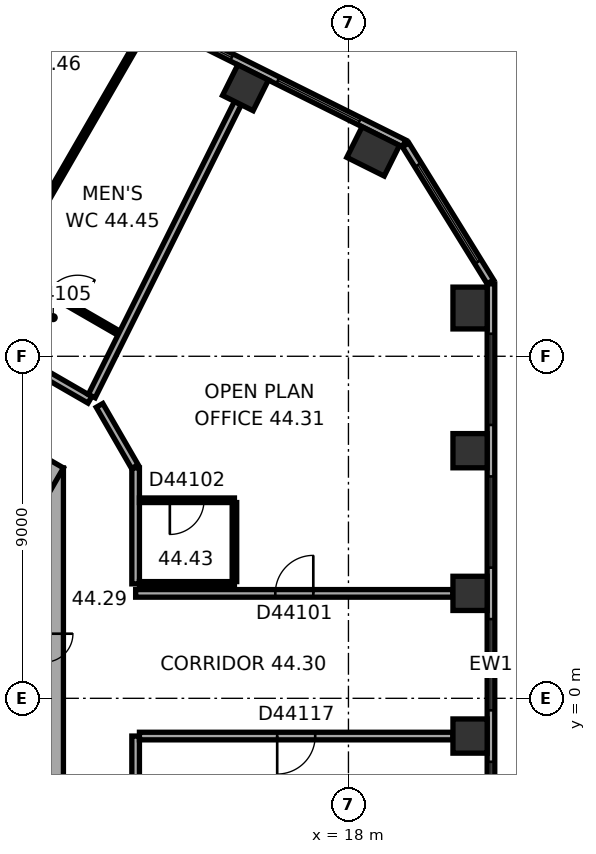
"""IFC4 building model, lengths in metres.
Left out: names, types, materials, properties, quantities, classifications, styles, units other than length and angle.
Written with IfcOpenShell. Run it as: python <this file> out.ifc"""

import sys

from ifc_helpers import new_model, si_unit, direction, frame, frame_2d, origin, origin_2d, place, context, subcontext, project, spatial, rectangle, extrude, element, fill, save


model = new_model("IFC4")
c1 = context("Model", 3, precision=1e-05, world=origin(), true_north=direction((0.0, 1.0)))
c2 = subcontext(c1, "Body", "Model", "MODEL_VIEW")
j1 = project(units=[si_unit("LENGTHUNIT", "METRE"), si_unit("PLANEANGLEUNIT", "RADIAN")], contexts=[c1])
p1 = place(None, origin())
s1 = spatial("IfcSite", under=j1, at=p1, CompositionType="ELEMENT")
p2 = place(p1, origin())
s2 = spatial("IfcBuilding", under=s1, at=p2, CompositionType="ELEMENT")
p3 = place(p2, frame((0.0, 0.0, 179.9)))
s3 = spatial("IfcBuildingStorey", under=s2, at=p3, CompositionType="ELEMENT", Elevation=179.9)
for number, where, z_axis, x_axis in (
    (1, (21.2, -0.993, 0.0), (0.0, 0.0, 1.0), (0.0, 1.0, 0.0)),
    (2, (21.2, 2.761, 0.0), (0.0, 0.0, 1.0), (0.0, 1.0, 0.0)),
    (3, (21.2, 6.515, 0.0), (0.0, 0.0, 1.0), (0.0, 1.0, 0.0)),
):
    element("IfcColumn", number, at=place(p3, frame(where, z_axis=z_axis, x_axis=x_axis)), inside=s3, PredefinedType="COLUMN", context=c2, shape_type="SweptSolid", body=[
        extrude(rectangle(XDim=0.9, YDim=0.9, at=origin_2d()), origin(), (0.0, 0.0, 1.0), 3.7),
    ])
for number, where, z_axis, x_axis in (
    (4, (21.2, 10.27, 0.0), (0.0, 0.0, 1.0), (0.0, 1.0, 0.0)),
    (5, (18.65, 14.39, 0.0), (0.0, 0.0, 1.0), (-0.895, 0.446, 0.0)),
):
    element("IfcColumn", number, at=place(p3, frame(where, z_axis=z_axis, x_axis=x_axis)), inside=s3, PredefinedType="COLUMN", context=c2, shape_type="SweptSolid", body=[
        extrude(rectangle(XDim=1.1, YDim=0.9, at=origin_2d()), origin(), (0.0, 0.0, 1.0), 3.7),
    ])
p4 = place(p3, frame((15.29, 16.065, 0.0), z_axis=(0.0, 0.0, 1.0), x_axis=(-0.894934361602, 0.44619781311, 0.0)))
e6 = element("IfcColumn", 6, at=p4, inside=s3, PredefinedType="COLUMN", context=c2, shape_type="SweptSolid", body=[
    extrude(rectangle(XDim=0.9, YDim=0.9, at=origin_2d()), origin(), (0.0, 0.0, 1.0), 3.7),
])
p5 = place(p3, frame((10.0, -6.062, 0.0), z_axis=(0.0, 0.0, 1.0), x_axis=(0.0, 1.0, 0.0)))
e7 = element("IfcWall", 7, at=p5, inside=s3, PredefinedType="SHEAR", context=c2, shape_type="SweptSolid", body=[
    extrude(rectangle(XDim=12.125, YDim=1.0, at=frame_2d((6.062, 0.0))), origin(), (0.0, 0.0, 1.0), 3.7),
])
p6 = place(p5, frame((6.262, 0.0, 0.0)))
e8 = element("IfcOpeningElement", 8, at=p6, cuts=e7, PredefinedType="OPENING", context=c2, shape_type="SweptSolid", body=[
    extrude(rectangle(XDim=1.5, YDim=2.1, at=frame_2d((0.75, 1.05))), frame((0.0, 0.51, 0.0), z_axis=(0.0, -1.0, 0.0), x_axis=(1.0, 0.0, 0.0)), (0.0, 0.0, 1.0), 1.02),
])
p7 = place(p5, frame((3.112, 0.0, 0.0)))
e9 = element("IfcOpeningElement", 9, at=p7, cuts=e7, PredefinedType="OPENING", context=c2, shape_type="SweptSolid", body=[
    extrude(rectangle(XDim=0.9, YDim=2.1, at=frame_2d((0.45, 1.05))), frame((0.0, 0.51, 0.0), z_axis=(0.0, -1.0, 0.0), x_axis=(1.0, 0.0, 0.0)), (0.0, 0.0, 1.0), 1.02),
])
p8 = place(p3, frame((10.25, 5.629, 0.0), z_axis=(0.0, 0.0, 1.0), x_axis=(-0.866022616891, 0.50000482701, 0.0)))
e10 = element("IfcWall", 10, at=p8, inside=s3, PredefinedType="SHEAR", context=c2, shape_type="SweptSolid", body=[
    extrude(rectangle(XDim=12.125, YDim=1.0, at=frame_2d((6.062, 0.0))), origin(), (0.0, 0.0, 1.0), 3.7),
])
p9 = place(p8, frame((5.312, 0.0, 0.0)))
e11 = element("IfcOpeningElement", 11, at=p9, cuts=e10, PredefinedType="OPENING", context=c2, shape_type="SweptSolid", body=[
    extrude(rectangle(XDim=0.9, YDim=2.1, at=frame_2d((0.45, 1.05))), frame((0.0, 0.51, 0.0), z_axis=(0.0, -1.0, 0.0), x_axis=(1.0, 0.0, 0.0)), (0.0, 0.0, 1.0), 1.02),
])
p10 = place(p3, frame((21.75, -9.138, 0.0), z_axis=(0.0, 0.0, 1.0), x_axis=(0.0, 1.0, 0.0)))
e12 = element("IfcWall", 12, at=p10, inside=s3, PredefinedType="STANDARD", context=c2, shape_type="SweptSolid", body=[
    extrude(rectangle(XDim=20.044, YDim=0.2, at=frame_2d((10.022, 0.0))), origin(), (0.0, 0.0, 1.0), 3.7),
])
p11 = place(p10, frame((1.314, 0.0, 0.9)))
e13 = element("IfcOpeningElement", 13, at=p11, cuts=e12, PredefinedType="OPENING", context=c2, shape_type="SweptSolid", body=[
    extrude(rectangle(XDim=2.4, YDim=2.0, at=frame_2d((1.2, 1.0))), frame((0.0, 0.11, 0.0), z_axis=(0.0, -1.0, 0.0), x_axis=(1.0, 0.0, 0.0)), (0.0, 0.0, 1.0), 0.22),
])
p12 = place(p10, frame((5.069, 0.0, 0.9)))
e14 = element("IfcOpeningElement", 14, at=p12, cuts=e12, PredefinedType="OPENING", context=c2, shape_type="SweptSolid", body=[
    extrude(rectangle(XDim=2.4, YDim=2.0, at=frame_2d((1.2, 1.0))), frame((0.0, 0.11, 0.0), z_axis=(0.0, -1.0, 0.0), x_axis=(1.0, 0.0, 0.0)), (0.0, 0.0, 1.0), 0.22),
])
p13 = place(p10, frame((8.823, 0.0, 0.9)))
e15 = element("IfcOpeningElement", 15, at=p13, cuts=e12, PredefinedType="OPENING", context=c2, shape_type="SweptSolid", body=[
    extrude(rectangle(XDim=2.4, YDim=2.0, at=frame_2d((1.2, 1.0))), frame((0.0, 0.11, 0.0), z_axis=(0.0, -1.0, 0.0), x_axis=(1.0, 0.0, 0.0)), (0.0, 0.0, 1.0), 0.22),
])
p14 = place(p10, frame((12.577, 0.0, 0.9)))
e16 = element("IfcOpeningElement", 16, at=p14, cuts=e12, PredefinedType="OPENING", context=c2, shape_type="SweptSolid", body=[
    extrude(rectangle(XDim=2.4, YDim=2.0, at=frame_2d((1.2, 1.0))), frame((0.0, 0.11, 0.0), z_axis=(0.0, -1.0, 0.0), x_axis=(1.0, 0.0, 0.0)), (0.0, 0.0, 1.0), 0.22),
])
p15 = place(p10, frame((16.331, 0.0, 0.9)))
e17 = element("IfcOpeningElement", 17, at=p15, cuts=e12, PredefinedType="OPENING", context=c2, shape_type="SweptSolid", body=[
    extrude(rectangle(XDim=2.4, YDim=2.0, at=frame_2d((1.2, 1.0))), frame((0.0, 0.11, 0.0), z_axis=(0.0, -1.0, 0.0), x_axis=(1.0, 0.0, 0.0)), (0.0, 0.0, 1.0), 0.22),
])
p16 = place(p3, frame((21.735, 10.958, 0.0), z_axis=(0.0, 0.0, 1.0), x_axis=(-0.526213807775, 0.850352296702, 0.0)))
e18 = element("IfcWall", 18, at=p16, inside=s3, PredefinedType="STANDARD", context=c2, shape_type="SweptSolid", body=[
    extrude(rectangle(XDim=4.238, YDim=0.2, at=frame_2d((2.119, 0.0))), origin(), (0.0, 0.0, 1.0), 3.7),
])
p17 = place(p16, frame((0.619, 0.0, 0.9)))
e19 = element("IfcOpeningElement", 19, at=p17, cuts=e18, PredefinedType="OPENING", context=c2, shape_type="SweptSolid", body=[
    extrude(rectangle(XDim=3.0, YDim=2.0, at=frame_2d((1.5, 1.0))), frame((0.0, 0.11, 0.0), z_axis=(0.0, -1.0, 0.0), x_axis=(1.0, 0.0, 0.0)), (0.0, 0.0, 1.0), 0.22),
])
p18 = place(p3, frame((19.464, 14.599, 0.0), z_axis=(0.0, 0.0, 1.0), x_axis=(-0.894935755043, 0.446195018289, 0.0)))
e20 = element("IfcWall", 20, at=p18, inside=s3, PredefinedType="STANDARD", context=c2, shape_type="SweptSolid", body=[
    extrude(rectangle(XDim=20.044, YDim=0.2, at=frame_2d((10.022, 0.0))), origin(), (0.0, 0.0, 1.0), 3.7),
])
p19 = place(p18, frame((1.313, 0.0, 0.9)))
e21 = element("IfcOpeningElement", 21, at=p19, cuts=e20, PredefinedType="OPENING", context=c2, shape_type="SweptSolid", body=[
    extrude(rectangle(XDim=2.4, YDim=2.0, at=frame_2d((1.2, 1.0))), frame((0.0, 0.11, 0.0), z_axis=(0.0, -1.0, 0.0), x_axis=(1.0, 0.0, 0.0)), (0.0, 0.0, 1.0), 0.22),
])
p20 = place(p18, frame((5.067, 0.0, 0.9)))
e22 = element("IfcOpeningElement", 22, at=p20, cuts=e20, PredefinedType="OPENING", context=c2, shape_type="SweptSolid", body=[
    extrude(rectangle(XDim=2.4, YDim=2.0, at=frame_2d((1.2, 1.0))), frame((0.0, 0.11, 0.0), z_axis=(0.0, -1.0, 0.0), x_axis=(1.0, 0.0, 0.0)), (0.0, 0.0, 1.0), 0.22),
])
p21 = place(p18, frame((8.821, 0.0, 0.9)))
e23 = element("IfcOpeningElement", 23, at=p21, cuts=e20, PredefinedType="OPENING", context=c2, shape_type="SweptSolid", body=[
    extrude(rectangle(XDim=2.4, YDim=2.0, at=frame_2d((1.2, 1.0))), frame((0.0, 0.11, 0.0), z_axis=(0.0, -1.0, 0.0), x_axis=(1.0, 0.0, 0.0)), (0.0, 0.0, 1.0), 0.22),
])
p22 = place(p18, frame((12.575, 0.0, 0.9)))
e24 = element("IfcOpeningElement", 24, at=p22, cuts=e20, PredefinedType="OPENING", context=c2, shape_type="SweptSolid", body=[
    extrude(rectangle(XDim=2.4, YDim=2.0, at=frame_2d((1.2, 1.0))), frame((0.0, 0.11, 0.0), z_axis=(0.0, -1.0, 0.0), x_axis=(1.0, 0.0, 0.0)), (0.0, 0.0, 1.0), 0.22),
])
p23 = place(p18, frame((16.329, 0.0, 0.9)))
e25 = element("IfcOpeningElement", 25, at=p23, cuts=e20, PredefinedType="OPENING", context=c2, shape_type="SweptSolid", body=[
    extrude(rectangle(XDim=2.4, YDim=2.0, at=frame_2d((1.2, 1.0))), frame((0.0, 0.11, 0.0), z_axis=(0.0, -1.0, 0.0), x_axis=(1.0, 0.0, 0.0)), (0.0, 0.0, 1.0), 0.22),
])
p24 = place(p3, frame((11.196, 7.854, 0.0), z_axis=(0.0, 0.0, 1.0), x_axis=(-0.866023877043, 0.500002644385, 0.0)))
e26 = element("IfcWall", 26, at=p24, inside=s3, PredefinedType="PARTITIONING", context=c2, shape_type="SweptSolid", body=[
    extrude(rectangle(XDim=11.792, YDim=0.2, at=frame_2d((5.896, 0.0))), origin(), (0.0, 0.0, 1.0), 3.42),
])
p25 = place(p24, frame((3.261, 0.0, 0.0)))
e27 = element("IfcOpeningElement", 27, at=p25, cuts=e26, PredefinedType="OPENING", context=c2, shape_type="SweptSolid", body=[
    extrude(rectangle(XDim=1.0, YDim=2.1, at=frame_2d((0.5, 1.05))), frame((0.0, 0.11, 0.0), z_axis=(0.0, -1.0, 0.0), x_axis=(1.0, 0.0, 0.0)), (0.0, 0.0, 1.0), 0.22),
])
p26 = place(p3, frame((11.959, 9.608, 0.0), z_axis=(0.0, 0.0, 1.0), x_axis=(-0.866018452427, 0.500012039911, 0.0)))
e28 = element("IfcWall", 28, at=p26, inside=s3, PredefinedType="PARTITIONING", context=c2, shape_type="SweptSolid", body=[
    extrude(rectangle(XDim=7.322, YDim=0.12, at=frame_2d((3.661, 0.0))), origin(), (0.0, 0.0, 1.0), 3.42),
])
p27 = place(p26, frame((5.858, 0.0, 0.0)))
e29 = element("IfcOpeningElement", 29, at=p27, cuts=e28, PredefinedType="OPENING", context=c2, shape_type="SweptSolid", body=[
    extrude(rectangle(XDim=1.0, YDim=2.1, at=frame_2d((0.5, 1.05))), frame((0.0, 0.07, 0.0), z_axis=(0.0, -1.0, 0.0), x_axis=(1.0, 0.0, 0.0)), (0.0, 0.0, 1.0), 0.14),
])
p28 = place(p26, frame((1.25, 0.0, 0.0)))
e30 = element("IfcOpeningElement", 30, at=p28, cuts=e28, PredefinedType="OPENING", context=c2, shape_type="SweptSolid", body=[
    extrude(rectangle(XDim=0.9, YDim=2.1, at=frame_2d((0.45, 1.05))), frame((0.0, 0.07, 0.0), z_axis=(0.0, -1.0, 0.0), x_axis=(1.0, 0.0, 0.0)), (0.0, 0.0, 1.0), 0.14),
])
p29 = place(p26, frame((3.947, 0.0, 0.0)))
e31 = element("IfcOpeningElement", 31, at=p29, cuts=e28, PredefinedType="OPENING", context=c2, shape_type="SweptSolid", body=[
    extrude(rectangle(XDim=0.9, YDim=2.1, at=frame_2d((0.45, 1.05))), frame((0.0, 0.07, 0.0), z_axis=(0.0, -1.0, 0.0), x_axis=(1.0, 0.0, 0.0)), (0.0, 0.0, 1.0), 0.14),
])
p30 = place(p3, frame((12.325, 17.041, 0.0), z_axis=(0.0, 0.0, 1.0), x_axis=(-0.499985538654, -0.866033752885, 0.0)))
e32 = element("IfcWall", 32, at=p30, inside=s3, PredefinedType="PARTITIONING", context=c2, shape_type="SweptSolid", body=[
    extrude(rectangle(XDim=6.56, YDim=0.12, at=frame_2d((3.28, 0.0))), origin(), (0.0, 0.0, 1.0), 3.42),
])
p31 = place(p3, frame((12.38, 6.097, 0.0), z_axis=(0.0, 0.0, 1.0), x_axis=(-0.499964847546, 0.866045698112, 0.0)))
e33 = element("IfcWall", 33, at=p31, inside=s3, PredefinedType="PARTITIONING", context=c2, shape_type="SweptSolid", body=[
    extrude(rectangle(XDim=1.86, YDim=0.2, at=frame_2d((0.93, 0.0))), origin(), (0.0, 0.0, 1.0), 3.42),
])
p32 = place(p3, frame((12.4, -6.022, 0.0), z_axis=(0.0, 0.0, 1.0), x_axis=(0.0, 1.0, 0.0)))
e34 = element("IfcWall", 34, at=p32, inside=s3, PredefinedType="PARTITIONING", context=c2, shape_type="SweptSolid", body=[
    extrude(rectangle(XDim=5.029, YDim=0.2, at=frame_2d((2.515, 0.0))), origin(), (0.0, 0.0, 1.0), 3.42),
])
p33 = place(p3, frame((12.4, 3.011, 0.0), z_axis=(0.0, 0.0, 1.0), x_axis=(0.0, 1.0, 0.0)))
e35 = element("IfcWall", 35, at=p33, inside=s3, PredefinedType="PARTITIONING", context=c2, shape_type="SweptSolid", body=[
    extrude(rectangle(XDim=3.051, YDim=0.2, at=frame_2d((1.525, 0.0))), origin(), (0.0, 0.0, 1.0), 3.42),
])
p34 = place(p3, frame((12.5, -0.993, 0.0), z_axis=(0.0, 0.0, 1.0), x_axis=(1.0, 0.0, 0.0)))
e36 = element("IfcWall", 36, at=p34, inside=s3, PredefinedType="PARTITIONING", context=c2, shape_type="SweptSolid", body=[
    extrude(rectangle(XDim=8.25, YDim=0.2, at=frame_2d((4.125, 0.0))), origin(), (0.0, 0.0, 1.0), 2.87),
])
p35 = place(p34, frame((3.625, 0.0, 0.0)))
e37 = element("IfcOpeningElement", 37, at=p35, cuts=e36, PredefinedType="OPENING", context=c2, shape_type="SweptSolid", body=[
    extrude(rectangle(XDim=1.0, YDim=2.1, at=frame_2d((0.5, 1.05))), frame((0.0, 0.11, 0.0), z_axis=(0.0, -1.0, 0.0), x_axis=(1.0, 0.0, 0.0)), (0.0, 0.0, 1.0), 0.22),
])
p36 = place(p3, frame((12.5, 5.211, 0.0), z_axis=(0.0, 0.0, 1.0), x_axis=(1.0, 0.0, 0.0)))
e38 = element("IfcWall", 38, at=p36, inside=s3, PredefinedType="PARTITIONING", context=c2, shape_type="SweptSolid", body=[
    extrude(rectangle(XDim=2.5, YDim=0.12, at=frame_2d((1.25, 0.0))), origin(), (0.0, 0.0, 1.0), 3.42),
])
p37 = place(p36, frame((0.8, 0.0, 0.0)))
e39 = element("IfcOpeningElement", 39, at=p37, cuts=e38, PredefinedType="OPENING", context=c2, shape_type="SweptSolid", body=[
    extrude(rectangle(XDim=0.9, YDim=2.1, at=frame_2d((0.45, 1.05))), frame((0.0, 0.07, 0.0), z_axis=(0.0, -1.0, 0.0), x_axis=(1.0, 0.0, 0.0)), (0.0, 0.0, 1.0), 0.14),
])
p38 = place(p3, frame((15.0, 3.011, 0.0), z_axis=(0.0, 0.0, 1.0), x_axis=(-1.0, 0.0, 0.0)))
e40 = element("IfcWall", 40, at=p38, inside=s3, PredefinedType="PARTITIONING", context=c2, shape_type="SweptSolid", body=[
    extrude(rectangle(XDim=2.5, YDim=0.12, at=frame_2d((1.25, 0.0))), origin(), (0.0, 0.0, 1.0), 3.42),
])
p39 = place(p3, frame((15.0, 5.151, 0.0), z_axis=(0.0, 0.0, 1.0), x_axis=(0.0, -1.0, 0.0)))
e41 = element("IfcWall", 41, at=p39, inside=s3, PredefinedType="PARTITIONING", context=c2, shape_type="SweptSolid", body=[
    extrude(rectangle(XDim=2.08, YDim=0.12, at=frame_2d((1.04, 0.0))), origin(), (0.0, 0.0, 1.0), 3.42),
])
p40 = place(p3, frame((15.09, 15.663, 0.0), z_axis=(0.0, 0.0, 1.0), x_axis=(-0.446204491029, -0.894931032083, 0.0)))
e42 = element("IfcWall", 42, at=p40, inside=s3, PredefinedType="PARTITIONING", context=c2, shape_type="SweptSolid", body=[
    extrude(rectangle(XDim=8.615, YDim=0.2, at=frame_2d((4.308, 0.0))), origin(), (0.0, 0.0, 1.0), 3.42),
])
p41 = place(p3, frame((20.75, 2.761, 0.0), z_axis=(0.0, 0.0, 1.0), x_axis=(-1.0, 0.0, 0.0)))
e43 = element("IfcWall", 43, at=p41, inside=s3, PredefinedType="PARTITIONING", context=c2, shape_type="SweptSolid", body=[
    extrude(rectangle(XDim=8.35, YDim=0.2, at=frame_2d((4.175, 0.0))), origin(), (0.0, 0.0, 1.0), 3.42),
])
p42 = place(p41, frame((3.675, 0.0, 0.0)))
e44 = element("IfcOpeningElement", 44, at=p42, cuts=e43, PredefinedType="OPENING", context=c2, shape_type="SweptSolid", body=[
    extrude(rectangle(XDim=1.0, YDim=2.1, at=frame_2d((0.5, 1.05))), frame((0.0, 0.11, 0.0), z_axis=(0.0, -1.0, 0.0), x_axis=(1.0, 0.0, 0.0)), (0.0, 0.0, 1.0), 0.22),
])
p43 = place(p12, origin())
e45 = element("IfcWindow", 45, at=p43, inside=s3, PartitioningType="SINGLE_PANEL", PredefinedType="WINDOW", context=c2, shape_type="SweptSolid", body=[
    extrude(rectangle(XDim=2.4, YDim=2.0, at=frame_2d((1.2, 1.0))), frame((0.0, 0.03, 0.0), z_axis=(0.0, -1.0, 0.0), x_axis=(1.0, 0.0, 0.0)), (0.0, 0.0, 1.0), 0.06),
])
fill(e14, e45)
p44 = place(p13, origin())
e46 = element("IfcWindow", 46, at=p44, inside=s3, PartitioningType="SINGLE_PANEL", PredefinedType="WINDOW", context=c2, shape_type="SweptSolid", body=[
    extrude(rectangle(XDim=2.4, YDim=2.0, at=frame_2d((1.2, 1.0))), frame((0.0, 0.03, 0.0), z_axis=(0.0, -1.0, 0.0), x_axis=(1.0, 0.0, 0.0)), (0.0, 0.0, 1.0), 0.06),
])
fill(e15, e46)
p45 = place(p14, origin())
e47 = element("IfcWindow", 47, at=p45, inside=s3, PartitioningType="SINGLE_PANEL", PredefinedType="WINDOW", context=c2, shape_type="SweptSolid", body=[
    extrude(rectangle(XDim=2.4, YDim=2.0, at=frame_2d((1.2, 1.0))), frame((0.0, 0.03, 0.0), z_axis=(0.0, -1.0, 0.0), x_axis=(1.0, 0.0, 0.0)), (0.0, 0.0, 1.0), 0.06),
])
fill(e16, e47)
p46 = place(p15, origin())
e48 = element("IfcWindow", 48, at=p46, inside=s3, PartitioningType="SINGLE_PANEL", PredefinedType="WINDOW", context=c2, shape_type="SweptSolid", body=[
    extrude(rectangle(XDim=2.4, YDim=2.0, at=frame_2d((1.2, 1.0))), frame((0.0, 0.03, 0.0), z_axis=(0.0, -1.0, 0.0), x_axis=(1.0, 0.0, 0.0)), (0.0, 0.0, 1.0), 0.06),
])
fill(e17, e48)
p47 = place(p17, origin())
e49 = element("IfcWindow", 49, at=p47, inside=s3, PartitioningType="SINGLE_PANEL", PredefinedType="WINDOW", context=c2, shape_type="SweptSolid", body=[
    extrude(rectangle(XDim=3.0, YDim=2.0, at=frame_2d((1.5, 1.0))), frame((0.0, 0.03, 0.0), z_axis=(0.0, -1.0, 0.0), x_axis=(1.0, 0.0, 0.0)), (0.0, 0.0, 1.0), 0.06),
])
fill(e19, e49)
p48 = place(p19, origin())
e50 = element("IfcWindow", 50, at=p48, inside=s3, PartitioningType="SINGLE_PANEL", PredefinedType="WINDOW", context=c2, shape_type="SweptSolid", body=[
    extrude(rectangle(XDim=2.4, YDim=2.0, at=frame_2d((1.2, 1.0))), frame((0.0, 0.03, 0.0), z_axis=(0.0, -1.0, 0.0), x_axis=(1.0, 0.0, 0.0)), (0.0, 0.0, 1.0), 0.06),
])
fill(e21, e50)
p49 = place(p20, origin())
e51 = element("IfcWindow", 51, at=p49, inside=s3, PartitioningType="SINGLE_PANEL", PredefinedType="WINDOW", context=c2, shape_type="SweptSolid", body=[
    extrude(rectangle(XDim=2.4, YDim=2.0, at=frame_2d((1.2, 1.0))), frame((0.0, 0.03, 0.0), z_axis=(0.0, -1.0, 0.0), x_axis=(1.0, 0.0, 0.0)), (0.0, 0.0, 1.0), 0.06),
])
fill(e22, e51)
p50 = place(p42, origin())
e52 = element("IfcDoor", 52, at=p50, inside=s3, OperationType="SINGLE_SWING_LEFT", PredefinedType="DOOR", context=c2, shape_type="SweptSolid", body=[
    extrude(rectangle(XDim=1.0, YDim=2.1, at=frame_2d((0.5, 1.05))), frame((0.0, 0.025, 0.0), z_axis=(0.0, -1.0, 0.0), x_axis=(1.0, 0.0, 0.0)), (0.0, 0.0, 1.0), 0.05),
])
fill(e44, e52)
p51 = place(p37, origin())
e53 = element("IfcDoor", 53, at=p51, inside=s3, OperationType="SINGLE_SWING_LEFT", PredefinedType="DOOR", context=c2, shape_type="SweptSolid", body=[
    extrude(rectangle(XDim=0.9, YDim=2.1, at=frame_2d((0.45, 1.05))), frame((0.0, 0.025, 0.0), z_axis=(0.0, -1.0, 0.0), x_axis=(1.0, 0.0, 0.0)), (0.0, 0.0, 1.0), 0.05),
])
fill(e39, e53)
p52 = place(p28, origin())
e54 = element("IfcDoor", 54, at=p52, inside=s3, OperationType="SINGLE_SWING_LEFT", PredefinedType="DOOR", context=c2, shape_type="SweptSolid", body=[
    extrude(rectangle(XDim=0.9, YDim=2.1, at=frame_2d((0.45, 1.05))), frame((0.0, 0.025, 0.0), z_axis=(0.0, -1.0, 0.0), x_axis=(1.0, 0.0, 0.0)), (0.0, 0.0, 1.0), 0.05),
])
fill(e30, e54)
p53 = place(p35, origin())
e55 = element("IfcDoor", 55, at=p53, inside=s3, OperationType="SINGLE_SWING_LEFT", PredefinedType="DOOR", context=c2, shape_type="SweptSolid", body=[
    extrude(rectangle(XDim=1.0, YDim=2.1, at=frame_2d((0.5, 1.05))), frame((0.0, 0.025, 0.0), z_axis=(0.0, -1.0, 0.0), x_axis=(1.0, 0.0, 0.0)), (0.0, 0.0, 1.0), 0.05),
])
fill(e37, e55)
save(model, sys.argv[1])
